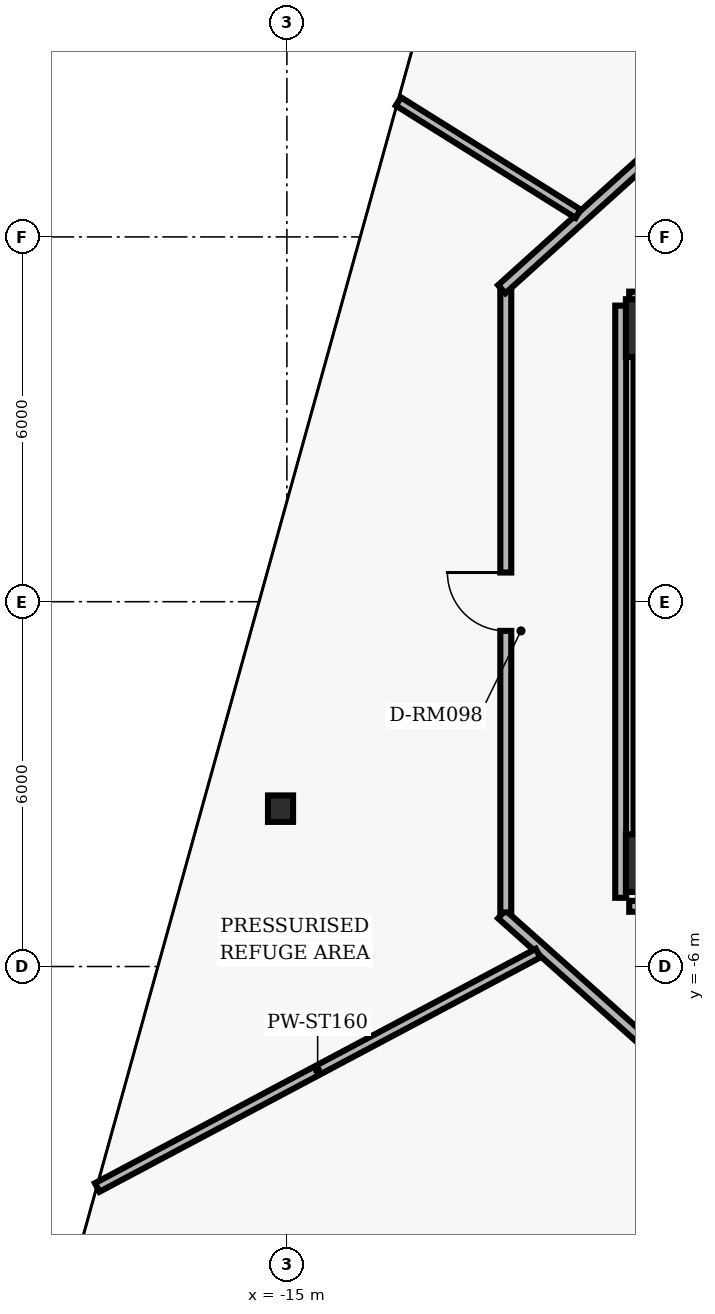
"""IFC4 building model, lengths in metres.
Left out: names, types, materials, properties, quantities, classifications, styles, units other than length and angle.
Written with IfcOpenShell. Run it as: python <this file> out.ifc"""

import sys

from ifc_helpers import new_model, si_unit, direction, frame, frame_2d, origin, origin_2d, place, context, subcontext, project, spatial, rectangle, hollow_rectangle, i_section, extrude, element, fill, save


model = new_model("IFC4")
c1 = context("Model", 3, precision=1e-05, world=origin(), true_north=direction((0.0, 1.0)))
c2 = subcontext(c1, "Body", "Model", "MODEL_VIEW")
j1 = project(units=[si_unit("LENGTHUNIT", "METRE"), si_unit("PLANEANGLEUNIT", "RADIAN")], contexts=[c1])
p1 = place(None, origin())
s1 = spatial("IfcSite", under=j1, at=p1, CompositionType="ELEMENT")
p2 = place(p1, origin())
s2 = spatial("IfcBuilding", under=s1, at=p2, CompositionType="ELEMENT")
p3 = place(p2, frame((0.0, 0.0, 100.8)))
s3 = spatial("IfcBuildingStorey", under=s2, at=p3, CompositionType="ELEMENT", Elevation=100.8)
for number, where, z_axis, x_axis in (
    (1, (-8.95, 4.5, 0.0), (0.0, 0.0, 1.0), (1.0, 0.0, 0.0)),
    (2, (-8.95, -4.3, 0.0), (0.0, 0.0, 1.0), (1.0, 0.0, 0.0)),
):
    element("IfcColumn", number, at=place(p3, frame(where, z_axis=z_axis, x_axis=x_axis)), inside=s3, PredefinedType="COLUMN", context=c2, shape_type="SweptSolid", body=[
        extrude(hollow_rectangle(XDim=0.95, YDim=0.95, WallThickness=0.06, InnerFilletRadius=0.02, OuterFilletRadius=0.04, at=origin_2d()), origin(), (0.0, 0.0, 1.0), 3.84),
    ])
p4 = place(p3, frame((-8.95, -3.825, 0.0), z_axis=(0.0, 0.0, 1.0), x_axis=(0.0, 1.0, 0.0)))
e3 = element("IfcWall", 3, at=p4, inside=s3, PredefinedType="SHEAR", context=c2, shape_type="SweptSolid", body=[
    extrude(rectangle(XDim=7.85, YDim=0.7, at=frame_2d((3.925, 0.0))), origin(), (0.0, 0.0, 1.0), 3.418),
])
p5 = place(p3, frame((-15.104, -3.404, 0.0), z_axis=(0.0, 0.0, 1.0), x_axis=(1.0, 0.0, 0.0)))
e4 = element("IfcColumn", 4, at=p5, inside=s3, PredefinedType="COLUMN", context=c2, shape_type="SweptSolid", body=[
    extrude(i_section(OverallWidth=0.412, OverallDepth=0.435, WebThickness=0.036, FlangeThickness=0.057, FilletRadius=0.022, at=origin_2d()), origin(), (0.0, 0.0, 1.0), 3.84),
])
p6 = place(p3, frame((-6.867, -9.24, 0.0), z_axis=(0.0, 0.0, 1.0), x_axis=(-0.746532095616, 0.665349404611, 0.0)))
e5 = element("IfcWall", 5, at=p6, inside=s3, PredefinedType="PARTITIONING", context=c2, shape_type="SweptSolid", body=[
    extrude(rectangle(XDim=6.162, YDim=0.18, at=frame_2d((3.081, 0.0))), origin(), (0.0, 0.0, 1.0), 3.393),
])
p7 = place(p3, frame((-11.4, -5.11, 0.0), z_axis=(0.0, 0.0, 1.0), x_axis=(0.0, 1.0, 0.0)))
e6 = element("IfcWall", 6, at=p7, inside=s3, PredefinedType="PARTITIONING", context=c2, shape_type="SweptSolid", body=[
    extrude(rectangle(XDim=10.22, YDim=0.18, at=frame_2d((5.11, 0.0))), origin(), (0.0, 0.0, 1.0), 2.907),
])
p8 = place(p7, frame((4.63, 0.0, 0.0)))
e7 = element("IfcOpeningElement", 7, at=p8, cuts=e6, PredefinedType="OPENING", context=c2, shape_type="SweptSolid", body=[
    extrude(rectangle(XDim=0.96, YDim=2.02, at=frame_2d((0.48, 1.01))), frame((0.0, 0.1, 0.0), z_axis=(0.0, -1.0, 0.0), x_axis=(1.0, 0.0, 0.0)), (0.0, 0.0, 1.0), 0.2),
])
p9 = place(p3, frame((-11.467, 5.14, 0.0), z_axis=(0.0, 0.0, 1.0), x_axis=(0.742486327971, 0.669861219042, 0.0)))
e8 = element("IfcWall", 8, at=p9, inside=s3, PredefinedType="PARTITIONING", context=c2, shape_type="SweptSolid", body=[
    extrude(rectangle(XDim=6.196, YDim=0.18, at=frame_2d((3.098, 0.0))), origin(), (0.0, 0.0, 1.0), 3.393),
])
p10 = place(p3, frame((-9.51, 4.87, 0.0), z_axis=(0.0, 0.0, 1.0), x_axis=(0.0, -1.0, 0.0)))
e9 = element("IfcWall", 9, at=p10, inside=s3, PredefinedType="PARTITIONING", context=c2, shape_type="SweptSolid", body=[
    extrude(rectangle(XDim=9.74, YDim=0.18, at=frame_2d((4.87, 0.0))), origin(), (0.0, 0.0, 1.0), 2.907),
])
p11 = place(p3, frame((-9.37, -5.01, 0.0), z_axis=(0.0, 0.0, 1.0), x_axis=(1.0, 0.0, 0.0)))
e10 = element("IfcWall", 10, at=p11, inside=s3, PredefinedType="PARTITIONING", context=c2, shape_type="SweptSolid", body=[
    extrude(rectangle(XDim=3.34, YDim=0.18, at=frame_2d((1.67, 0.0))), origin(), (0.0, 0.0, 1.0), 3.393),
])
p12 = place(p3, frame((-6.562, 5.01, 0.0), z_axis=(0.0, 0.0, 1.0), x_axis=(-1.0, 0.0, 0.0)))
e11 = element("IfcWall", 11, at=p12, inside=s3, PredefinedType="PARTITIONING", context=c2, shape_type="SweptSolid", body=[
    extrude(rectangle(XDim=2.808, YDim=0.18, at=frame_2d((1.404, 0.0))), origin(), (0.0, 0.0, 1.0), 3.393),
])
p13 = place(p3, frame((-10.87, -5.78, 0.0), z_axis=(0.0, 0.0, 1.0), x_axis=(-0.882935860211, -0.469493628022, 0.0)))
e12 = element("IfcWall", 12, at=p13, inside=s3, PredefinedType="PARTITIONING", context=c2, shape_type="SweptSolid", body=[
    extrude(rectangle(XDim=8.21, YDim=0.16, at=frame_2d((4.105, 0.0))), origin(), (0.0, 0.0, 1.0), 3.393),
])
p14 = place(p3, frame((-10.211, 6.381, 0.0), z_axis=(0.0, 0.0, 1.0), x_axis=(-0.848061277386, 0.529898169272, 0.0)))
e13 = element("IfcWall", 13, at=p14, inside=s3, PredefinedType="PARTITIONING", context=c2, shape_type="SweptSolid", body=[
    extrude(rectangle(XDim=3.485, YDim=0.16, at=frame_2d((1.742, 0.0))), origin(), (0.0, 0.0, 1.0), 3.393),
])
p15 = place(p8, origin())
e14 = element("IfcDoor", 14, at=p15, inside=s3, OperationType="SINGLE_SWING_RIGHT", PredefinedType="DOOR", context=c2, shape_type="SweptSolid", body=[
    extrude(rectangle(XDim=0.96, YDim=2.02, at=frame_2d((0.48, 1.01))), frame((0.0, 0.025, 0.0), z_axis=(0.0, -1.0, 0.0), x_axis=(1.0, 0.0, 0.0)), (0.0, 0.0, 1.0), 0.05),
])
fill(e7, e14)
save(model, sys.argv[1])
